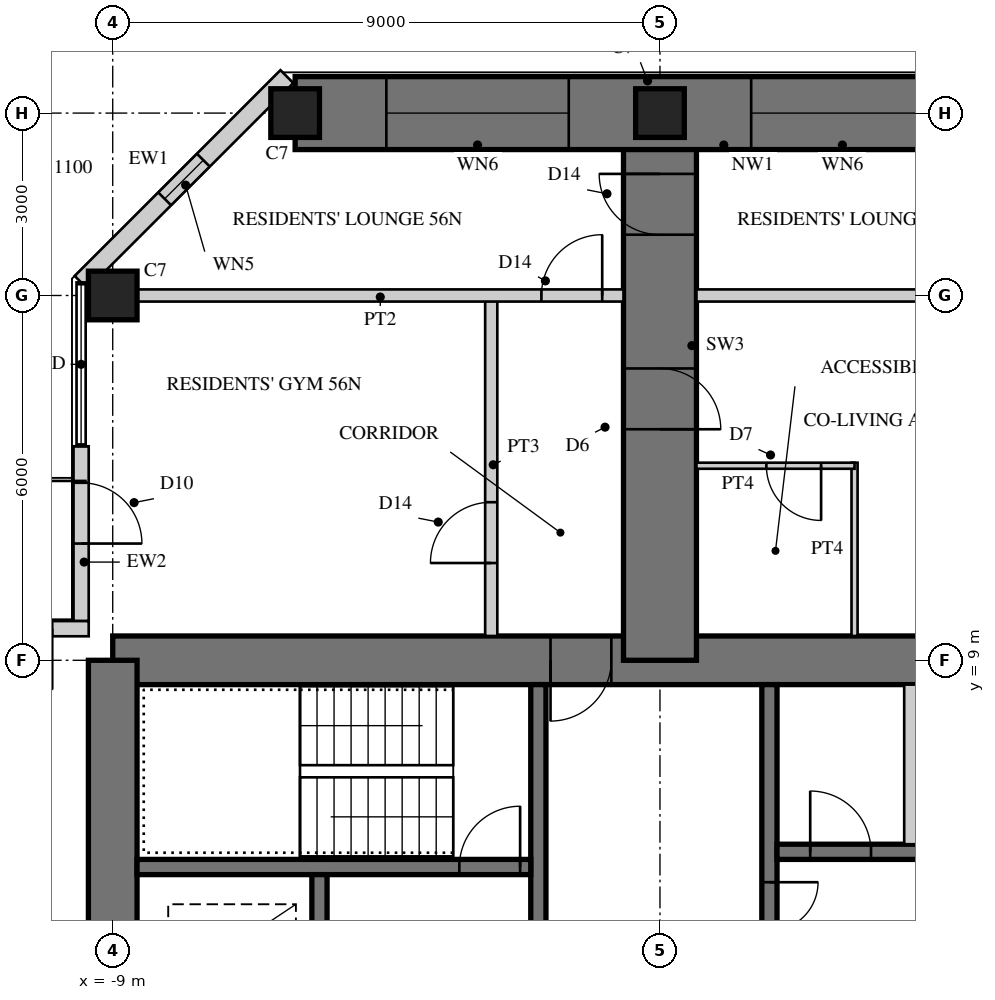
"""IFC4 building model, lengths in metres.
Left out: names, types, materials, properties, quantities, classifications, styles, units other than length and angle.
Written with IfcOpenShell. Run it as: python <this file> out.ifc"""

import sys

from ifc_helpers import new_model, si_unit, direction, frame, frame_2d, origin, origin_2d, place, context, subcontext, project, spatial, rectangle, hollow_rectangle, extrude, element, fill, save


model = new_model("IFC4")
c1 = context("Model", 3, precision=1e-05, world=origin(), true_north=direction((0.0, 1.0)))
c2 = subcontext(c1, "Body", "Model", "MODEL_VIEW")
j1 = project(units=[si_unit("LENGTHUNIT", "METRE"), si_unit("PLANEANGLEUNIT", "RADIAN")], contexts=[c1])
p1 = place(None, origin())
s1 = spatial("IfcSite", under=j1, at=p1, CompositionType="ELEMENT")
p2 = place(p1, origin())
s2 = spatial("IfcBuilding", under=s1, at=p2, CompositionType="ELEMENT")
p3 = place(p2, frame((0.0, 0.0, 222.1)))
s3 = spatial("IfcBuildingStorey", under=s2, at=p3, CompositionType="ELEMENT", Elevation=222.1)
p4 = place(p3, frame((9.0, 9.0, 0.0), z_axis=(0.0, 0.0, 1.0), x_axis=(-1.0, 0.0, 0.0)))
e1 = element("IfcWall", 1, at=p4, inside=s3, PredefinedType="SHEAR", context=c2, shape_type="SweptSolid", body=[
    extrude(rectangle(XDim=18.0, YDim=0.8, at=frame_2d((9.0, 0.0))), origin(), (0.0, 0.0, 1.0), 3.4),
])
p5 = place(p4, frame((9.8, 0.0, 0.0)))
e2 = element("IfcOpeningElement", 2, at=p5, cuts=e1, PredefinedType="OPENING", context=c2, shape_type="SweptSolid", body=[
    extrude(rectangle(XDim=1.0, YDim=2.4, at=frame_2d((0.5, 1.2))), frame((0.0, 0.41, 0.0), z_axis=(0.0, -1.0, 0.0), x_axis=(1.0, 0.0, 0.0)), (0.0, 0.0, 1.0), 0.82),
])
p6 = place(p3, frame((-9.0, 9.0, 0.0), z_axis=(0.0, 0.0, 1.0), x_axis=(0.0, -1.0, 0.0)))
e3 = element("IfcWall", 3, at=p6, inside=s3, PredefinedType="SHEAR", context=c2, shape_type="SweptSolid", body=[
    extrude(rectangle(XDim=18.0, YDim=0.8, at=frame_2d((9.0, 0.0))), origin(), (0.0, 0.0, 1.0), 3.4),
])
p7 = place(p6, frame((9.8, 0.0, 0.0)))
e4 = element("IfcOpeningElement", 4, at=p7, cuts=e3, PredefinedType="OPENING", context=c2, shape_type="SweptSolid", body=[
    extrude(rectangle(XDim=1.0, YDim=2.4, at=frame_2d((0.5, 1.2))), frame((0.0, 0.41, 0.0), z_axis=(0.0, -1.0, 0.0), x_axis=(1.0, 0.0, 0.0)), (0.0, 0.0, 1.0), 0.82),
])
p8 = place(p3, frame((1.8, 1.875, 0.0), z_axis=(0.0, 0.0, 1.0), x_axis=(0.0, 1.0, 0.0)))
e5 = element("IfcWall", 5, at=p8, inside=s3, PredefinedType="SHEAR", context=c2, shape_type="SweptSolid", body=[
    extrude(rectangle(XDim=6.725, YDim=0.25, at=frame_2d((3.363, 0.0))), origin(), (0.0, 0.0, 1.0), 3.4),
])
p9 = place(p8, frame((1.875, 0.0, 0.0)))
e6 = element("IfcOpeningElement", 6, at=p9, cuts=e5, PredefinedType="OPENING", context=c2, shape_type="SweptSolid", body=[
    extrude(rectangle(XDim=1.6, YDim=2.4, at=frame_2d((0.8, 1.2))), frame((0.0, 0.135, 0.0), z_axis=(0.0, -1.0, 0.0), x_axis=(1.0, 0.0, 0.0)), (0.0, 0.0, 1.0), 0.27),
])
p10 = place(p3, frame((1.925, 5.85, 0.0), z_axis=(0.0, 0.0, 1.0), x_axis=(1.0, 0.0, 0.0)))
e7 = element("IfcWall", 7, at=p10, inside=s3, PredefinedType="SHEAR", context=c2, shape_type="SweptSolid", body=[
    extrude(rectangle(XDim=6.675, YDim=0.25, at=frame_2d((3.337, 0.0))), origin(), (0.0, 0.0, 1.0), 3.4),
])
p11 = place(p10, frame((0.546, 0.0, 0.0)))
e8 = element("IfcOpeningElement", 8, at=p11, cuts=e7, PredefinedType="OPENING", context=c2, shape_type="SweptSolid", body=[
    extrude(rectangle(XDim=1.0, YDim=2.1, at=frame_2d((0.5, 1.05))), frame((0.0, 0.135, 0.0), z_axis=(0.0, -1.0, 0.0), x_axis=(1.0, 0.0, 0.0)), (0.0, 0.0, 1.0), 0.27),
])
p12 = place(p10, frame((2.837, 0.0, 0.0)))
e9 = element("IfcOpeningElement", 9, at=p12, cuts=e7, PredefinedType="OPENING", context=c2, shape_type="SweptSolid", body=[
    extrude(rectangle(XDim=1.0, YDim=2.1, at=frame_2d((0.5, 1.05))), frame((0.0, 0.135, 0.0), z_axis=(0.0, -1.0, 0.0), x_axis=(1.0, 0.0, 0.0)), (0.0, 0.0, 1.0), 0.27),
])
p13 = place(p3, frame((4.117, 5.975, 0.0), z_axis=(0.0, 0.0, 1.0), x_axis=(0.0, 1.0, 0.0)))
e10 = element("IfcWall", 10, at=p13, inside=s3, PredefinedType="PARTITIONING", context=c2, shape_type="SweptSolid", body=[
    extrude(rectangle(XDim=2.625, YDim=0.2, at=frame_2d((1.312, 0.0))), origin(), (0.0, 0.0, 1.0), 3.4),
])
p14 = place(p3, frame((-2.0, 1.675, 0.0), z_axis=(0.0, 0.0, 1.0), x_axis=(0.0, 1.0, 0.0)))
e11 = element("IfcWall", 11, at=p14, inside=s3, PredefinedType="SHEAR", context=c2, shape_type="SweptSolid", body=[
    extrude(rectangle(XDim=6.925, YDim=0.25, at=frame_2d((3.462, 0.0))), origin(), (0.0, 0.0, 1.0), 3.4),
])
p15 = place(p14, frame((0.725, 0.0, 0.0)))
e12 = element("IfcOpeningElement", 12, at=p15, cuts=e11, PredefinedType="OPENING", context=c2, shape_type="SweptSolid", body=[
    extrude(rectangle(XDim=1.0, YDim=2.1, at=frame_2d((0.5, 1.05))), frame((0.0, 0.135, 0.0), z_axis=(0.0, -1.0, 0.0), x_axis=(1.0, 0.0, 0.0)), (0.0, 0.0, 1.0), 0.27),
])
p16 = place(p3, frame((-2.125, 5.6, 0.0), z_axis=(0.0, 0.0, 1.0), x_axis=(-1.0, 0.0, 0.0)))
e13 = element("IfcWall", 13, at=p16, inside=s3, PredefinedType="SHEAR", context=c2, shape_type="SweptSolid", body=[
    extrude(rectangle(XDim=6.475, YDim=0.25, at=frame_2d((3.238, 0.0))), origin(), (0.0, 0.0, 1.0), 3.4),
])
p17 = place(p16, frame((0.175, 0.0, 0.0)))
e14 = element("IfcOpeningElement", 14, at=p17, cuts=e13, PredefinedType="OPENING", context=c2, shape_type="SweptSolid", body=[
    extrude(rectangle(XDim=1.0, YDim=2.1, at=frame_2d((0.5, 1.05))), frame((0.0, 0.135, 0.0), z_axis=(0.0, -1.0, 0.0), x_axis=(1.0, 0.0, 0.0)), (0.0, 0.0, 1.0), 0.27),
])
p18 = place(p3, frame((-5.6, 1.925, 0.0), z_axis=(0.0, 0.0, 1.0), x_axis=(0.0, 1.0, 0.0)))
e15 = element("IfcWall", 15, at=p18, inside=s3, PredefinedType="SHEAR", context=c2, shape_type="SweptSolid", body=[
    extrude(rectangle(XDim=3.55, YDim=0.25, at=frame_2d((1.775, 0.0))), origin(), (0.0, 0.0, 1.0), 3.4),
])
p19 = place(p18, frame((1.525, 0.0, 0.0)))
e16 = element("IfcOpeningElement", 16, at=p19, cuts=e15, PredefinedType="OPENING", context=c2, shape_type="SweptSolid", body=[
    extrude(rectangle(XDim=1.1, YDim=2.2, at=frame_2d((0.55, 1.1))), frame((0.0, 0.135, 0.0), z_axis=(0.0, -1.0, 0.0), x_axis=(1.0, 0.0, 0.0)), (0.0, 0.0, 1.0), 0.27),
])
p20 = place(p18, frame((0.075, 0.0, 0.0)))
e17 = element("IfcOpeningElement", 17, at=p20, cuts=e15, PredefinedType="OPENING", context=c2, shape_type="SweptSolid", body=[
    extrude(rectangle(XDim=0.8, YDim=2.1, at=frame_2d((0.4, 1.05))), frame((0.0, 0.135, 0.0), z_axis=(0.0, -1.0, 0.0), x_axis=(1.0, 0.0, 0.0)), (0.0, 0.0, 1.0), 0.27),
])
p21 = place(p3, frame((0.0, 9.0, 0.0), z_axis=(0.0, 0.0, 1.0), x_axis=(0.0, 1.0, 0.0)))
e18 = element("IfcWall", 18, at=p21, inside=s3, PredefinedType="SHEAR", context=c2, shape_type="SweptSolid", body=[
    extrude(rectangle(XDim=9.0, YDim=1.2, at=frame_2d((4.5, 0.0))), origin(), (0.0, 0.0, 1.0), 3.4),
])
p22 = place(p21, frame((3.8, 0.0, 0.0)))
e19 = element("IfcOpeningElement", 19, at=p22, cuts=e18, PredefinedType="OPENING", context=c2, shape_type="SweptSolid", body=[
    extrude(rectangle(XDim=1.0, YDim=2.15, at=frame_2d((0.5, 1.075))), frame((0.0, 0.61, 0.0), z_axis=(0.0, -1.0, 0.0), x_axis=(1.0, 0.0, 0.0)), (0.0, 0.0, 1.0), 1.22),
])
p23 = place(p21, frame((7.0, 0.0, 0.0)))
e20 = element("IfcOpeningElement", 20, at=p23, cuts=e18, PredefinedType="OPENING", context=c2, shape_type="SweptSolid", body=[
    extrude(rectangle(XDim=1.0, YDim=2.2, at=frame_2d((0.5, 1.1))), frame((0.0, 0.61, 0.0), z_axis=(0.0, -1.0, 0.0), x_axis=(1.0, 0.0, 0.0)), (0.0, 0.0, 1.0), 1.22),
])
p24 = place(p3, frame((6.0, 18.0, 0.0), z_axis=(0.0, 0.0, 1.0), x_axis=(-1.0, 0.0, 0.0)))
e21 = element("IfcWall", 21, at=p24, inside=s3, PredefinedType="SHEAR", context=c2, shape_type="SweptSolid", body=[
    extrude(rectangle(XDim=12.0, YDim=1.2, at=frame_2d((6.0, 0.0))), origin(), (0.0, 0.0, 1.0), 3.4),
])
p25 = place(p24, frame((1.5, 0.0, 0.6)))
e22 = element("IfcOpeningElement", 22, at=p25, cuts=e21, PredefinedType="OPENING", context=c2, shape_type="SweptSolid", body=[
    extrude(rectangle(XDim=3.0, YDim=2.4, at=frame_2d((1.5, 1.2))), frame((0.0, 0.61, 0.0), z_axis=(0.0, -1.0, 0.0), x_axis=(1.0, 0.0, 0.0)), (0.0, 0.0, 1.0), 1.22),
])
p26 = place(p24, frame((7.5, 0.0, 0.6)))
e23 = element("IfcOpeningElement", 23, at=p26, cuts=e21, PredefinedType="OPENING", context=c2, shape_type="SweptSolid", body=[
    extrude(rectangle(XDim=3.0, YDim=2.4, at=frame_2d((1.5, 1.2))), frame((0.0, 0.61, 0.0), z_axis=(0.0, -1.0, 0.0), x_axis=(1.0, 0.0, 0.0)), (0.0, 0.0, 1.0), 1.22),
])
for number, where, z_axis, x_axis in (
    (24, (-9.0, 15.0, 0.0), (0.0, 0.0, 1.0), (1.0, 0.0, 0.0)),
    (25, (0.0, 18.0, 0.0), (0.0, 0.0, 1.0), (1.0, 0.0, 0.0)),
    (26, (-6.0, 18.0, 0.0), (0.0, 0.0, 1.0), (1.0, 0.0, 0.0)),
):
    element("IfcColumn", number, at=place(p3, frame(where, z_axis=z_axis, x_axis=x_axis)), inside=s3, PredefinedType="COLUMN", context=c2, shape_type="SweptSolid", body=[
        extrude(rectangle(XDim=0.8, YDim=0.8, at=origin_2d()), origin(), (0.0, 0.0, 1.0), 3.4),
    ])
p27 = place(p3, frame((-6.135, 18.6, 0.0), z_axis=(0.0, 0.0, 1.0), x_axis=(-0.707081278264, -0.707132283189, 0.0)))
e27 = element("IfcWall", 27, at=p27, inside=s3, PredefinedType="SOLIDWALL", context=c2, shape_type="SweptSolid", body=[
    extrude(rectangle(XDim=4.787, YDim=0.3, at=frame_2d((2.393, 0.0))), origin(), (0.0, 0.0, 1.0), 3.22),
])
p28 = place(p27, frame((1.943, 0.0, 0.3)))
e28 = element("IfcOpeningElement", 28, at=p28, cuts=e27, PredefinedType="OPENING", context=c2, shape_type="SweptSolid", body=[
    extrude(rectangle(XDim=0.9, YDim=2.4, at=frame_2d((0.45, 1.2))), frame((0.0, 0.16, 0.0), z_axis=(0.0, -1.0, 0.0), x_axis=(1.0, 0.0, 0.0)), (0.0, 0.0, 1.0), 0.32),
])
p29 = place(p3, frame((-9.52, 12.52, 0.0), z_axis=(0.0, 0.0, 1.0), x_axis=(0.0, -1.0, 0.0)))
e29 = element("IfcWall", 29, at=p29, inside=s3, PredefinedType="SOLIDWALL", context=c2, shape_type="SweptSolid", body=[
    extrude(rectangle(XDim=2.875, YDim=0.25, at=frame_2d((1.438, 0.0))), origin(), (0.0, 0.0, 1.0), 3.22),
])
p30 = place(p29, frame((0.6, 0.0, 0.0)))
e30 = element("IfcOpeningElement", 30, at=p30, cuts=e29, PredefinedType="OPENING", context=c2, shape_type="SweptSolid", body=[
    extrude(rectangle(XDim=1.0, YDim=2.2, at=frame_2d((0.5, 1.1))), frame((0.0, 0.135, 0.0), z_axis=(0.0, -1.0, 0.0), x_axis=(1.0, 0.0, 0.0)), (0.0, 0.0, 1.0), 0.27),
])
p31 = place(p3, frame((-9.395, 9.52, 0.0), z_axis=(0.0, 0.0, 1.0), x_axis=(-1.0, 0.0, 0.0)))
e31 = element("IfcWall", 31, at=p31, inside=s3, PredefinedType="SOLIDWALL", context=c2, shape_type="SweptSolid", body=[
    extrude(rectangle(XDim=3.125, YDim=0.25, at=frame_2d((1.562, 0.0))), origin(), (0.0, 0.0, 1.0), 3.22),
])
p32 = place(p31, frame((0.6, 0.0, 0.0)))
e32 = element("IfcOpeningElement", 32, at=p32, cuts=e31, PredefinedType="OPENING", context=c2, shape_type="SweptSolid", body=[
    extrude(rectangle(XDim=1.0, YDim=2.2, at=frame_2d((0.5, 1.1))), frame((0.0, 0.135, 0.0), z_axis=(0.0, -1.0, 0.0), x_axis=(1.0, 0.0, 0.0)), (0.0, 0.0, 1.0), 0.27),
])
p33 = place(p3, frame((3.2, 9.4, 0.0), z_axis=(0.0, 0.0, 1.0), x_axis=(0.0, 1.0, 0.0)))
e33 = element("IfcWall", 33, at=p33, inside=s3, PredefinedType="PARTITIONING", context=c2, shape_type="SweptSolid", body=[
    extrude(rectangle(XDim=2.85, YDim=0.1, at=frame_2d((1.425, 0.0))), origin(), (0.0, 0.0, 1.0), 3.22),
])
p34 = place(p3, frame((3.2, 12.2, 0.0), z_axis=(0.0, 0.0, 1.0), x_axis=(-1.0, 0.0, 0.0)))
e34 = element("IfcWall", 34, at=p34, inside=s3, PredefinedType="PARTITIONING", context=c2, shape_type="SweptSolid", body=[
    extrude(rectangle(XDim=2.6, YDim=0.1, at=frame_2d((1.3, 0.0))), origin(), (0.0, 0.0, 1.0), 3.22),
])
p35 = place(p34, frame((0.55, 0.0, 0.0)))
e35 = element("IfcOpeningElement", 35, at=p35, cuts=e34, PredefinedType="OPENING", context=c2, shape_type="SweptSolid", body=[
    extrude(rectangle(XDim=0.9, YDim=2.1, at=frame_2d((0.45, 1.05))), frame((0.0, 0.06, 0.0), z_axis=(0.0, -1.0, 0.0), x_axis=(1.0, 0.0, 0.0)), (0.0, 0.0, 1.0), 0.12),
])
p36 = place(p3, frame((-2.775, 9.4, 0.0), z_axis=(0.0, 0.0, 1.0), x_axis=(0.0, 1.0, 0.0)))
e36 = element("IfcWall", 36, at=p36, inside=s3, PredefinedType="SOLIDWALL", context=c2, shape_type="SweptSolid", body=[
    extrude(rectangle(XDim=5.6, YDim=0.2, at=frame_2d((2.8, 0.0))), origin(), (0.0, 0.0, 1.0), 3.22),
])
p37 = place(p36, frame((1.2, 0.0, 0.0)))
e37 = element("IfcOpeningElement", 37, at=p37, cuts=e36, PredefinedType="OPENING", context=c2, shape_type="SweptSolid", body=[
    extrude(rectangle(XDim=1.0, YDim=2.2, at=frame_2d((0.5, 1.1))), frame((0.0, 0.11, 0.0), z_axis=(0.0, -1.0, 0.0), x_axis=(1.0, 0.0, 0.0)), (0.0, 0.0, 1.0), 0.22),
])
p38 = place(p3, frame((8.6, 15.0, 0.0), z_axis=(0.0, 0.0, 1.0), x_axis=(-1.0, 0.0, 0.0)))
e38 = element("IfcWall", 38, at=p38, inside=s3, PredefinedType="SOLIDWALL", context=c2, shape_type="SweptSolid", body=[
    extrude(rectangle(XDim=8.0, YDim=0.2, at=frame_2d((4.0, 0.0))), origin(), (0.0, 0.0, 1.0), 2.52),
])
p39 = place(p3, frame((-0.6, 15.0, 0.0), z_axis=(0.0, 0.0, 1.0), x_axis=(-1.0, 0.0, 0.0)))
e39 = element("IfcWall", 39, at=p39, inside=s3, PredefinedType="SOLIDWALL", context=c2, shape_type="SweptSolid", body=[
    extrude(rectangle(XDim=8.0, YDim=0.2, at=frame_2d((4.0, 0.0))), origin(), (0.0, 0.0, 1.0), 2.52),
])
p40 = place(p39, frame((0.35, 0.0, 0.0)))
e40 = element("IfcOpeningElement", 40, at=p40, cuts=e39, PredefinedType="OPENING", context=c2, shape_type="SweptSolid", body=[
    extrude(rectangle(XDim=1.0, YDim=2.2, at=frame_2d((0.5, 1.1))), frame((0.0, 0.11, 0.0), z_axis=(0.0, -1.0, 0.0), x_axis=(1.0, 0.0, 0.0)), (0.0, 0.0, 1.0), 0.22),
])
p41 = place(p25, origin())
e41 = element("IfcWindow", 41, at=p41, inside=s3, PartitioningType="SINGLE_PANEL", PredefinedType="WINDOW", context=c2, shape_type="SweptSolid", body=[
    extrude(hollow_rectangle(XDim=3.0, YDim=2.4, WallThickness=0.06, at=frame_2d((1.5, 1.2))), frame((0.0, 0.03, 0.0), z_axis=(0.0, -1.0, 0.0), x_axis=(1.0, 0.0, 0.0)), (0.0, 0.0, 1.0), 0.06),
    extrude(rectangle(XDim=2.879, YDim=2.279, at=frame_2d((1.5, 1.2))), frame((0.0, 0.03, 0.0), z_axis=(0.0, -1.0, 0.0), x_axis=(1.0, 0.0, 0.0)), (0.0, 0.0, 1.0), 0.06),
])
fill(e22, e41)
p42 = place(p26, origin())
e42 = element("IfcWindow", 42, at=p42, inside=s3, PartitioningType="SINGLE_PANEL", PredefinedType="WINDOW", context=c2, shape_type="SweptSolid", body=[
    extrude(hollow_rectangle(XDim=3.0, YDim=2.4, WallThickness=0.06, at=frame_2d((1.5, 1.2))), frame((0.0, 0.03, 0.0), z_axis=(0.0, -1.0, 0.0), x_axis=(1.0, 0.0, 0.0)), (0.0, 0.0, 1.0), 0.06),
    extrude(rectangle(XDim=2.879, YDim=2.279, at=frame_2d((1.5, 1.2))), frame((0.0, 0.03, 0.0), z_axis=(0.0, -1.0, 0.0), x_axis=(1.0, 0.0, 0.0)), (0.0, 0.0, 1.0), 0.06),
])
fill(e23, e42)
p43 = place(p28, origin())
e43 = element("IfcWindow", 43, at=p43, inside=s3, PartitioningType="SINGLE_PANEL", PredefinedType="WINDOW", context=c2, shape_type="SweptSolid", body=[
    extrude(hollow_rectangle(XDim=0.9, YDim=2.4, WallThickness=0.06, at=frame_2d((0.45, 1.2))), frame((0.0, 0.03, 0.0), z_axis=(0.0, -1.0, 0.0), x_axis=(1.0, 0.0, 0.0)), (0.0, 0.0, 1.0), 0.06),
    extrude(rectangle(XDim=0.779, YDim=2.279, at=frame_2d((0.45, 1.2))), frame((0.0, 0.03, 0.0), z_axis=(0.0, -1.0, 0.0), x_axis=(1.0, 0.0, 0.0)), (0.0, 0.0, 1.0), 0.06),
])
fill(e28, e43)
p44 = place(p30, origin())
e44 = element("IfcDoor", 44, at=p44, inside=s3, OperationType="SINGLE_SWING_RIGHT", PredefinedType="DOOR", context=c2, shape_type="SweptSolid", body=[
    extrude(hollow_rectangle(XDim=1.0, YDim=2.2, WallThickness=0.06, at=frame_2d((0.5, 1.1))), frame((0.0, 0.025, 0.0), z_axis=(0.0, -1.0, 0.0), x_axis=(1.0, 0.0, 0.0)), (0.0, 0.0, 1.0), 0.05),
    extrude(rectangle(XDim=0.879, YDim=2.079, at=frame_2d((0.5, 1.1))), frame((0.0, 0.025, 0.0), z_axis=(0.0, -1.0, 0.0), x_axis=(1.0, 0.0, 0.0)), (0.0, 0.0, 1.0), 0.05),
])
fill(e30, e44)
p45 = place(p32, origin())
e45 = element("IfcDoor", 45, at=p45, inside=s3, OperationType="SINGLE_SWING_LEFT", PredefinedType="DOOR", context=c2, shape_type="SweptSolid", body=[
    extrude(hollow_rectangle(XDim=1.0, YDim=2.2, WallThickness=0.06, at=frame_2d((0.5, 1.1))), frame((0.0, 0.025, 0.0), z_axis=(0.0, -1.0, 0.0), x_axis=(1.0, 0.0, 0.0)), (0.0, 0.0, 1.0), 0.05),
    extrude(rectangle(XDim=0.879, YDim=2.079, at=frame_2d((0.5, 1.1))), frame((0.0, 0.025, 0.0), z_axis=(0.0, -1.0, 0.0), x_axis=(1.0, 0.0, 0.0)), (0.0, 0.0, 1.0), 0.05),
])
fill(e32, e45)
p46 = place(p35, origin())
e46 = element("IfcDoor", 46, at=p46, inside=s3, OperationType="SINGLE_SWING_LEFT", PredefinedType="DOOR", context=c2, shape_type="SweptSolid", body=[
    extrude(rectangle(XDim=0.9, YDim=2.1, at=frame_2d((0.45, 1.05))), frame((0.0, 0.025, 0.0), z_axis=(0.0, -1.0, 0.0), x_axis=(1.0, 0.0, 0.0)), (0.0, 0.0, 1.0), 0.05),
])
fill(e35, e46)
p47 = place(p37, origin())
e47 = element("IfcDoor", 47, at=p47, inside=s3, OperationType="SINGLE_SWING_LEFT", PredefinedType="DOOR", context=c2, shape_type="SweptSolid", body=[
    extrude(rectangle(XDim=1.0, YDim=2.2, at=frame_2d((0.5, 1.1))), frame((0.0, 0.025, 0.0), z_axis=(0.0, -1.0, 0.0), x_axis=(1.0, 0.0, 0.0)), (0.0, 0.0, 1.0), 0.05),
])
fill(e37, e47)
p48 = place(p40, frame((1.0, 0.0, 0.0), z_axis=(0.0, 0.0, 1.0), x_axis=(-1.0, 0.0, 0.0)))
e48 = element("IfcDoor", 48, at=p48, inside=s3, OperationType="SINGLE_SWING_RIGHT", PredefinedType="DOOR", context=c2, shape_type="SweptSolid", body=[
    extrude(rectangle(XDim=1.0, YDim=2.2, at=frame_2d((0.5, 1.1))), frame((0.0, 0.025, 0.0), z_axis=(0.0, -1.0, 0.0), x_axis=(1.0, 0.0, 0.0)), (0.0, 0.0, 1.0), 0.05),
])
fill(e40, e48)
p49 = place(p22, frame((1.0, 0.0, 0.0), z_axis=(0.0, 0.0, 1.0), x_axis=(-1.0, 0.0, 0.0)))
e49 = element("IfcDoor", 49, at=p49, inside=s3, OperationType="SINGLE_SWING_RIGHT", PredefinedType="DOOR", context=c2, shape_type="SweptSolid", body=[
    extrude(rectangle(XDim=1.0, YDim=2.15, at=frame_2d((0.5, 1.075))), frame((0.0, 0.025, 0.0), z_axis=(0.0, -1.0, 0.0), x_axis=(1.0, 0.0, 0.0)), (0.0, 0.0, 1.0), 0.05),
])
fill(e19, e49)
p50 = place(p23, origin())
e50 = element("IfcDoor", 50, at=p50, inside=s3, OperationType="SINGLE_SWING_RIGHT", PredefinedType="DOOR", context=c2, shape_type="SweptSolid", body=[
    extrude(rectangle(XDim=1.0, YDim=2.2, at=frame_2d((0.5, 1.1))), frame((0.0, 0.025, 0.0), z_axis=(0.0, -1.0, 0.0), x_axis=(1.0, 0.0, 0.0)), (0.0, 0.0, 1.0), 0.05),
])
fill(e20, e50)
p51 = place(p5, origin())
e51 = element("IfcDoor", 51, at=p51, inside=s3, OperationType="SINGLE_SWING_RIGHT", PredefinedType="DOOR", context=c2, shape_type="SweptSolid", body=[
    extrude(rectangle(XDim=1.0, YDim=2.4, at=frame_2d((0.5, 1.2))), frame((0.0, 0.055, 0.0), z_axis=(0.0, -1.0, 0.0), x_axis=(1.0, 0.0, 0.0)), (0.0, 0.0, 1.0), 0.05),
])
fill(e2, e51)
p52 = place(p9, frame((1.6, 0.0, 0.0), z_axis=(0.0, 0.0, 1.0), x_axis=(-1.0, 0.0, 0.0)))
e52 = element("IfcDoor", 52, at=p52, inside=s3, OperationType="DOUBLE_DOOR_SINGLE_SWING", PredefinedType="DOOR", context=c2, shape_type="SweptSolid", body=[
    extrude(rectangle(XDim=1.6, YDim=2.4, at=frame_2d((0.8, 1.2))), frame((0.0, 0.025, 0.0), z_axis=(0.0, -1.0, 0.0), x_axis=(1.0, 0.0, 0.0)), (0.0, 0.0, 1.0), 0.05),
])
fill(e6, e52)
p53 = place(p17, frame((1.0, 0.0, 0.0), z_axis=(0.0, 0.0, 1.0), x_axis=(-1.0, 0.0, 0.0)))
e53 = element("IfcDoor", 53, at=p53, inside=s3, OperationType="SINGLE_SWING_RIGHT", PredefinedType="DOOR", context=c2, shape_type="SweptSolid", body=[
    extrude(rectangle(XDim=1.0, YDim=2.1, at=frame_2d((0.5, 1.05))), frame((0.0, 0.025, 0.0), z_axis=(0.0, -1.0, 0.0), x_axis=(1.0, 0.0, 0.0)), (0.0, 0.0, 1.0), 0.05),
])
fill(e14, e53)
p54 = place(p11, origin())
e54 = element("IfcDoor", 54, at=p54, inside=s3, OperationType="SINGLE_SWING_LEFT", PredefinedType="DOOR", context=c2, shape_type="SweptSolid", body=[
    extrude(rectangle(XDim=1.0, YDim=2.1, at=frame_2d((0.5, 1.05))), frame((0.0, 0.025, 0.0), z_axis=(0.0, -1.0, 0.0), x_axis=(1.0, 0.0, 0.0)), (0.0, 0.0, 1.0), 0.05),
])
fill(e8, e54)
save(model, sys.argv[1])
